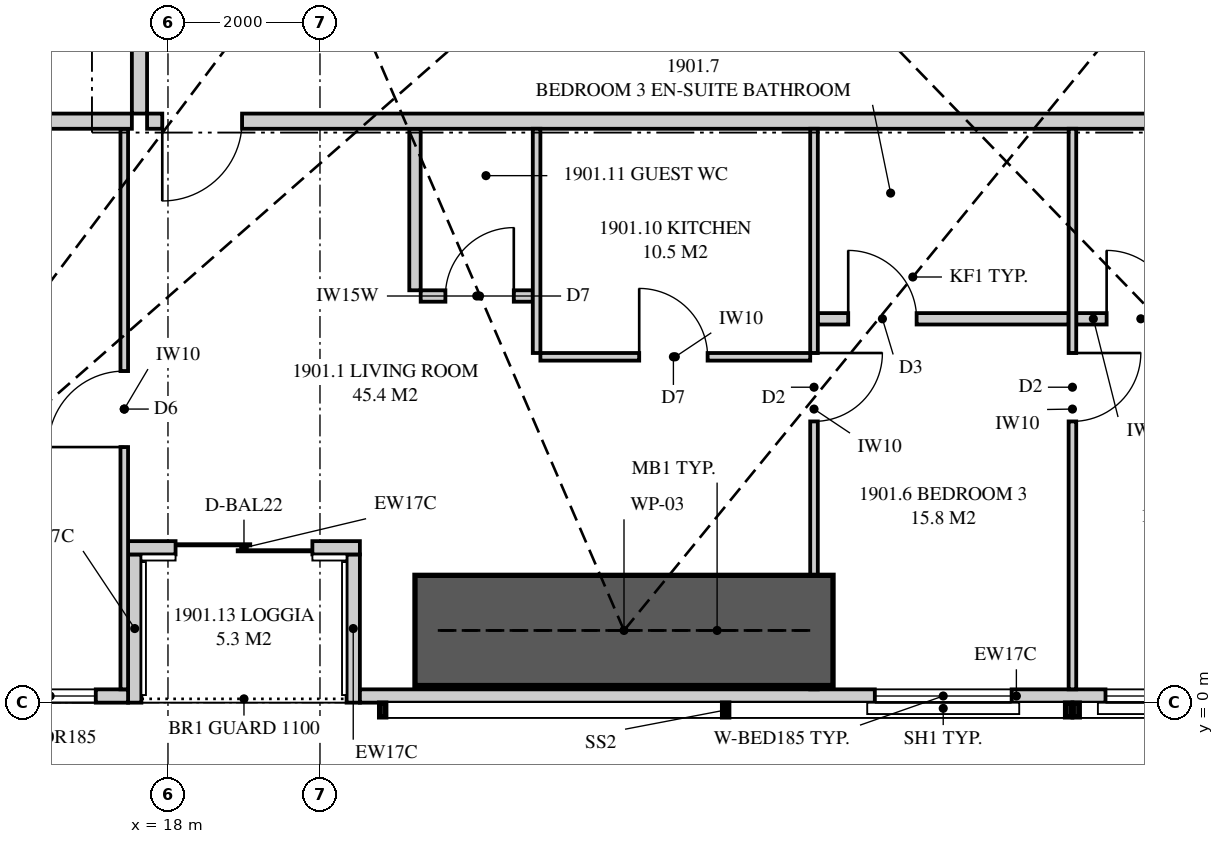
"""IFC4 building model, lengths in metres.
Left out: names, types, materials, properties, quantities, classifications, styles, units other than length and angle.
Written with IfcOpenShell. Run it as: python <this file> out.ifc"""

import sys

from ifc_helpers import new_model, si_unit, direction, frame, frame_2d, origin, place, context, subcontext, project, spatial, polyline, rectangle, outline, extrude, element, fill, save


model = new_model("IFC4")
c1 = context("Model", 3, precision=1e-05, world=origin(), true_north=direction((0.0, 1.0)))
c2 = subcontext(c1, "Body", "Model", "MODEL_VIEW")
j1 = project(units=[si_unit("LENGTHUNIT", "METRE"), si_unit("PLANEANGLEUNIT", "RADIAN")], contexts=[c1])
p1 = place(None, origin())
s1 = spatial("IfcSite", under=j1, at=p1, CompositionType="ELEMENT")
p2 = place(p1, origin())
s2 = spatial("IfcBuilding", under=s1, at=p2, CompositionType="ELEMENT")
p3 = place(p2, frame((0.0, 0.0, 71.25)))
s3 = spatial("IfcBuildingStorey", under=s2, at=p3, CompositionType="ELEMENT", Elevation=71.25)
p4 = place(p3, frame((5.051, 0.087, 0.0), z_axis=(0.0, 0.0, 1.0), x_axis=(1.0, 0.0, 0.0)))
e1 = element("IfcWall", 1, at=p4, inside=s3, PredefinedType="SOLIDWALL", context=c2, shape_type="SweptSolid", body=[
    extrude(rectangle(XDim=12.424, YDim=0.175, at=frame_2d((6.212, 0.0))), origin(), (0.0, 0.0, 1.0), 3.22),
])
p5 = place(p4, frame((2.424, 0.0, 0.4)))
e2 = element("IfcOpeningElement", 2, at=p5, cuts=e1, PredefinedType="OPENING", context=c2, shape_type="SweptSolid", body=[
    extrude(rectangle(XDim=1.8, YDim=1.85, at=frame_2d((0.9, 0.925))), frame((0.0, 0.097, 0.0), z_axis=(0.0, -1.0, 0.0), x_axis=(1.0, 0.0, 0.0)), (0.0, 0.0, 1.0), 0.195),
])
p6 = place(p4, frame((10.799, 0.0, 0.4)))
e3 = element("IfcOpeningElement", 3, at=p6, cuts=e1, PredefinedType="OPENING", context=c2, shape_type="SweptSolid", body=[
    extrude(rectangle(XDim=1.2, YDim=1.85, at=frame_2d((0.6, 0.925))), frame((0.0, 0.097, 0.0), z_axis=(0.0, -1.0, 0.0), x_axis=(1.0, 0.0, 0.0)), (0.0, 0.0, 1.0), 0.195),
])
p7 = place(p3, frame((20.525, 0.087, 0.0), z_axis=(0.0, 0.0, 1.0), x_axis=(1.0, 0.0, 0.0)))
e4 = element("IfcWall", 4, at=p7, inside=s3, PredefinedType="SOLIDWALL", context=c2, shape_type="SweptSolid", body=[
    extrude(rectangle(XDim=17.275, YDim=0.175, at=frame_2d((8.638, 0.0))), origin(), (0.0, 0.0, 1.0), 3.22),
])
p8 = place(p7, frame((6.775, 0.0, 0.4)))
e5 = element("IfcOpeningElement", 5, at=p8, cuts=e4, PredefinedType="OPENING", context=c2, shape_type="SweptSolid", body=[
    extrude(rectangle(XDim=1.8, YDim=1.85, at=frame_2d((0.9, 0.925))), frame((0.0, 0.097, 0.0), z_axis=(0.0, -1.0, 0.0), x_axis=(1.0, 0.0, 0.0)), (0.0, 0.0, 1.0), 0.195),
])
p9 = place(p7, frame((9.81, 0.0, 0.4)))
e6 = element("IfcOpeningElement", 6, at=p9, cuts=e4, PredefinedType="OPENING", context=c2, shape_type="SweptSolid", body=[
    extrude(rectangle(XDim=1.8, YDim=1.85, at=frame_2d((0.9, 0.925))), frame((0.0, 0.097, 0.0), z_axis=(0.0, -1.0, 0.0), x_axis=(1.0, 0.0, 0.0)), (0.0, 0.0, 1.0), 0.195),
])
p10 = place(p3, frame((17.475, 2.038, 0.0), z_axis=(0.0, 0.0, 1.0), x_axis=(1.0, 0.0, 0.0)))
e7 = element("IfcWall", 7, at=p10, inside=s3, PredefinedType="SOLIDWALL", context=c2, shape_type="SweptSolid", body=[
    extrude(rectangle(XDim=3.05, YDim=0.175, at=frame_2d((1.525, 0.0))), origin(), (0.0, 0.0, 1.0), 3.22),
])
p11 = place(p10, frame((0.625, 0.0, 0.0)))
e8 = element("IfcOpeningElement", 8, at=p11, cuts=e7, PredefinedType="OPENING", context=c2, shape_type="SweptSolid", body=[
    extrude(rectangle(XDim=1.8, YDim=2.25, at=frame_2d((0.9, 1.125))), frame((0.0, 0.097, 0.0), z_axis=(0.0, -1.0, 0.0), x_axis=(1.0, 0.0, 0.0)), (0.0, 0.0, 1.0), 0.195),
])
for number, where, z_axis, x_axis in (
    (9, (17.562, 0.0, 0.0), (0.0, 0.0, 1.0), (0.0, 1.0, 0.0)),
    (10, (20.438, 0.0, 0.0), (0.0, 0.0, 1.0), (0.0, 1.0, 0.0)),
):
    element("IfcWall", number, at=place(p3, frame(where, z_axis=z_axis, x_axis=x_axis)), inside=s3, PredefinedType="SOLIDWALL", context=c2, shape_type="SweptSolid", body=[
        extrude(outline(polyline([(0.0, 0.0), (1.95, 0.0), (1.95, 3.22), (1.65, 3.22), (1.65, 2.1), (0.25, 2.1), (0.25, 3.22), (0.0, 3.22), (0.0, 0.0)])), frame((0.0, 0.087, 0.0), z_axis=(0.0, -1.0, 0.0), x_axis=(1.0, 0.0, 0.0)), (0.0, 0.0, 1.0), 0.175),
    ])
p12 = place(p3, frame((17.725, 7.65, 0.0), z_axis=(0.0, 0.0, 1.0), x_axis=(1.0, 0.0, 0.0)))
e11 = element("IfcWall", 11, at=p12, inside=s3, PredefinedType="PARTITIONING", context=c2, shape_type="SweptSolid", body=[
    extrude(outline(polyline([(0.0, 0.0), (16.075, 0.0), (16.075, 3.22), (12.137, 3.22), (12.137, 2.641), (11.364, 2.641), (11.364, 3.22), (11.217, 3.22), (11.217, 2.641), (10.366, 2.641), (10.366, 3.22), (6.564, 3.22), (6.564, 2.694), (5.986, 2.694), (5.986, 3.22), (3.693, 3.22), (3.693, 2.641), (2.439, 2.641), (2.439, 3.22), (0.689, 3.22), (0.689, 2.641), (0.0, 2.641), (0.0, 0.0)])), frame((0.0, 0.1, 0.0), z_axis=(0.0, -1.0, 0.0), x_axis=(1.0, 0.0, 0.0)), (0.0, 0.0, 1.0), 0.2),
])
p13 = place(p12, frame((0.2, 0.0, 0.0)))
e12 = element("IfcOpeningElement", 12, at=p13, cuts=e11, PredefinedType="OPENING", context=c2, shape_type="SweptSolid", body=[
    extrude(rectangle(XDim=1.05, YDim=2.2, at=frame_2d((0.525, 1.1))), frame((0.0, 0.11, 0.0), z_axis=(0.0, -1.0, 0.0), x_axis=(1.0, 0.0, 0.0)), (0.0, 0.0, 1.0), 0.22),
])
p14 = place(p3, frame((26.5, 0.175, 0.0), z_axis=(0.0, 0.0, 1.0), x_axis=(0.0, 1.0, 0.0)))
e13 = element("IfcWall", 13, at=p14, inside=s3, PredefinedType="PARTITIONING", context=c2, shape_type="SweptSolid", body=[
    extrude(outline(polyline([(0.0, 0.0), (7.375, 0.0), (7.375, 3.22), (4.269, 3.22), (4.269, 2.641), (3.4, 2.641), (3.4, 3.22), (1.485, 3.22), (1.485, 2.947), (1.475, 2.947), (1.475, 2.1), (0.075, 2.1), (0.075, 2.947), (0.0, 2.947), (0.0, 0.0)])), frame((0.0, 0.05, 0.0), z_axis=(0.0, -1.0, 0.0), x_axis=(1.0, 0.0, 0.0)), (0.0, 0.0, 1.0), 0.1),
])
p15 = place(p14, frame((3.525, 0.0, 0.0)))
e14 = element("IfcOpeningElement", 14, at=p15, cuts=e13, PredefinedType="OPENING", context=c2, shape_type="SweptSolid", body=[
    extrude(rectangle(XDim=0.9, YDim=2.1, at=frame_2d((0.45, 1.05))), frame((0.0, 0.06, 0.0), z_axis=(0.0, -1.0, 0.0), x_axis=(1.0, 0.0, 0.0)), (0.0, 0.0, 1.0), 0.12),
])
p16 = place(p3, frame((29.9, 0.175, 0.0), z_axis=(0.0, 0.0, 1.0), x_axis=(0.0, 1.0, 0.0)))
e15 = element("IfcWall", 15, at=p16, inside=s3, PredefinedType="PARTITIONING", context=c2, shape_type="SweptSolid", body=[
    extrude(outline(polyline([(0.0, 0.0), (7.375, 0.0), (7.375, 3.22), (6.436, 3.22), (6.436, 2.641), (5.654, 2.641), (5.654, 3.22), (1.475, 3.22), (1.475, 2.1), (0.075, 2.1), (0.075, 3.22), (0.0, 3.22), (0.0, 0.0)])), frame((0.0, 0.05, 0.0), z_axis=(0.0, -1.0, 0.0), x_axis=(1.0, 0.0, 0.0)), (0.0, 0.0, 1.0), 0.1),
])
p17 = place(p16, frame((3.525, 0.0, 0.0)))
e16 = element("IfcOpeningElement", 16, at=p17, cuts=e15, PredefinedType="OPENING", context=c2, shape_type="SweptSolid", body=[
    extrude(rectangle(XDim=0.9, YDim=2.1, at=frame_2d((0.45, 1.05))), frame((0.0, 0.06, 0.0), z_axis=(0.0, -1.0, 0.0), x_axis=(1.0, 0.0, 0.0)), (0.0, 0.0, 1.0), 0.12),
])
p18 = place(p3, frame((26.55, 5.05, 0.0), z_axis=(0.0, 0.0, 1.0), x_axis=(1.0, 0.0, 0.0)))
e17 = element("IfcWall", 17, at=p18, inside=s3, PredefinedType="PLUMBINGWALL", context=c2, shape_type="SweptSolid", body=[
    extrude(outline(polyline([(0.0, 0.0), (3.3, 0.0), (3.3, 3.22), (1.167, 3.22), (1.167, 2.641), (0.434, 2.641), (0.434, 3.22), (0.0, 3.22), (0.0, 0.0)])), frame((0.0, 0.075, 0.0), z_axis=(0.0, -1.0, 0.0), x_axis=(1.0, 0.0, 0.0)), (0.0, 0.0, 1.0), 0.15),
])
p19 = place(p18, frame((0.4, 0.0, 0.0)))
e18 = element("IfcOpeningElement", 18, at=p19, cuts=e17, PredefinedType="OPENING", context=c2, shape_type="SweptSolid", body=[
    extrude(rectangle(XDim=0.9, YDim=2.1, at=frame_2d((0.45, 1.05))), frame((0.0, 0.085, 0.0), z_axis=(0.0, -1.0, 0.0), x_axis=(1.0, 0.0, 0.0)), (0.0, 0.0, 1.0), 0.17),
])
p20 = place(p3, frame((29.95, 5.05, 0.0), z_axis=(0.0, 0.0, 1.0), x_axis=(1.0, 0.0, 0.0)))
e19 = element("IfcWall", 19, at=p20, inside=s3, PredefinedType="PLUMBINGWALL", context=c2, shape_type="SweptSolid", body=[
    extrude(outline(polyline([(0.0, 0.0), (3.85, 0.0), (3.85, 3.22), (1.483, 3.22), (1.483, 2.641), (0.681, 2.641), (0.681, 3.22), (0.0, 3.22), (0.0, 0.0)])), frame((0.0, 0.075, 0.0), z_axis=(0.0, -1.0, 0.0), x_axis=(1.0, 0.0, 0.0)), (0.0, 0.0, 1.0), 0.15),
])
p21 = place(p20, frame((0.4, 0.0, 0.0)))
e20 = element("IfcOpeningElement", 20, at=p21, cuts=e19, PredefinedType="OPENING", context=c2, shape_type="SweptSolid", body=[
    extrude(rectangle(XDim=0.9, YDim=2.1, at=frame_2d((0.45, 1.05))), frame((0.0, 0.085, 0.0), z_axis=(0.0, -1.0, 0.0), x_axis=(1.0, 0.0, 0.0)), (0.0, 0.0, 1.0), 0.17),
])
p22 = place(p3, frame((22.9, 4.55, 0.0), z_axis=(0.0, 0.0, 1.0), x_axis=(1.0, 0.0, 0.0)))
e21 = element("IfcWall", 21, at=p22, inside=s3, PredefinedType="PARTITIONING", context=c2, shape_type="SweptSolid", body=[
    extrude(outline(polyline([(0.0, 0.0), (3.55, 0.0), (3.55, 3.22), (1.389, 3.22), (1.389, 2.694), (0.811, 2.694), (0.811, 3.22), (0.0, 3.22), (0.0, 0.0)])), frame((0.0, 0.05, 0.0), z_axis=(0.0, -1.0, 0.0), x_axis=(1.0, 0.0, 0.0)), (0.0, 0.0, 1.0), 0.1),
])
p23 = place(p22, frame((1.3, 0.0, 0.0)))
e22 = element("IfcOpeningElement", 22, at=p23, cuts=e21, PredefinedType="OPENING", context=c2, shape_type="SweptSolid", body=[
    extrude(rectangle(XDim=0.9, YDim=2.1, at=frame_2d((0.45, 1.05))), frame((0.0, 0.06, 0.0), z_axis=(0.0, -1.0, 0.0), x_axis=(1.0, 0.0, 0.0)), (0.0, 0.0, 1.0), 0.12),
])
p24 = place(p3, frame((22.85, 4.6, 0.0), z_axis=(0.0, 0.0, 1.0), x_axis=(0.0, 1.0, 0.0)))
e23 = element("IfcWall", 23, at=p24, inside=s3, PredefinedType="PARTITIONING", context=c2, shape_type="SweptSolid", body=[
    extrude(rectangle(XDim=2.95, YDim=0.1, at=frame_2d((1.475, 0.0))), origin(), (0.0, 0.0, 1.0), 3.22),
])
p25 = place(p3, frame((21.325, 5.35, 0.0), z_axis=(0.0, 0.0, 1.0), x_axis=(1.0, 0.0, 0.0)))
e24 = element("IfcWall", 24, at=p25, inside=s3, PredefinedType="PLUMBINGWALL", context=c2, shape_type="SweptSolid", body=[
    extrude(outline(polyline([(0.0, 0.0), (1.475, 0.0), (1.475, 3.22), (1.072, 3.22), (1.072, 2.641), (0.493, 2.641), (0.493, 3.22), (0.0, 3.22), (0.0, 0.0)])), frame((0.0, 0.075, 0.0), z_axis=(0.0, -1.0, 0.0), x_axis=(1.0, 0.0, 0.0)), (0.0, 0.0, 1.0), 0.15),
])
p26 = place(p25, frame((0.325, 0.0, 0.0)))
e25 = element("IfcOpeningElement", 25, at=p26, cuts=e24, PredefinedType="OPENING", context=c2, shape_type="SweptSolid", body=[
    extrude(rectangle(XDim=0.9, YDim=2.1, at=frame_2d((0.45, 1.05))), frame((0.0, 0.085, 0.0), z_axis=(0.0, -1.0, 0.0), x_axis=(1.0, 0.0, 0.0)), (0.0, 0.0, 1.0), 0.17),
])
p27 = place(p3, frame((21.25, 5.425, 0.0), z_axis=(0.0, 0.0, 1.0), x_axis=(0.0, 1.0, 0.0)))
e26 = element("IfcWall", 26, at=p27, inside=s3, PredefinedType="PLUMBINGWALL", context=c2, shape_type="SweptSolid", body=[
    extrude(outline(polyline([(0.0, 0.0), (2.125, 0.0), (2.125, 2.641), (1.146, 2.641), (1.146, 3.22), (0.0, 3.22), (0.0, 0.0)])), frame((0.0, 0.075, 0.0), z_axis=(0.0, -1.0, 0.0), x_axis=(1.0, 0.0, 0.0)), (0.0, 0.0, 1.0), 0.15),
])
p28 = place(p3, frame((17.425, 0.175, 0.0), z_axis=(0.0, 0.0, 1.0), x_axis=(0.0, 1.0, 0.0)))
e27 = element("IfcWall", 27, at=p28, inside=s3, PredefinedType="PARTITIONING", context=c2, shape_type="SweptSolid", body=[
    extrude(outline(polyline([(0.0, 0.0), (7.375, 0.0), (7.375, 3.22), (7.113, 3.22), (7.113, 2.641), (6.195, 2.641), (6.195, 3.22), (5.015, 3.22), (5.015, 2.641), (4.299, 2.641), (4.299, 3.22), (1.475, 3.22), (1.475, 2.1), (0.075, 2.1), (0.075, 3.22), (0.0, 3.22), (0.0, 0.0)])), frame((0.0, 0.05, 0.0), z_axis=(0.0, -1.0, 0.0), x_axis=(1.0, 0.0, 0.0)), (0.0, 0.0, 1.0), 0.1),
])
p29 = place(p28, frame((3.188, 0.0, 0.0)))
e28 = element("IfcOpeningElement", 28, at=p29, cuts=e27, PredefinedType="OPENING", context=c2, shape_type="SweptSolid", body=[
    extrude(rectangle(XDim=1.0, YDim=2.1, at=frame_2d((0.5, 1.05))), frame((0.0, 0.06, 0.0), z_axis=(0.0, -1.0, 0.0), x_axis=(1.0, 0.0, 0.0)), (0.0, 0.0, 1.0), 0.12),
])
p30 = place(p3, frame((2.0, 7.65, 0.0), z_axis=(0.0, 0.0, 1.0), x_axis=(1.0, 0.0, 0.0)))
e29 = element("IfcWall", 29, at=p30, inside=s3, PredefinedType="PARTITIONING", context=c2, shape_type="SweptSolid", body=[
    extrude(outline(polyline([(0.0, 0.0), (15.525, 0.0), (15.525, 3.22), (11.349, 3.22), (11.349, 2.621), (10.651, 2.621), (10.651, 3.22), (9.51, 3.22), (9.51, 2.62), (6.89, 2.62), (6.89, 3.22), (2.98, 3.22), (2.98, 2.621), (2.543, 2.621), (2.543, 2.1), (1.092, 2.1), (1.092, 3.22), (0.0, 3.22), (0.0, 0.0)])), frame((0.0, 0.1, 0.0), z_axis=(0.0, -1.0, 0.0), x_axis=(1.0, 0.0, 0.0)), (0.0, 0.0, 1.0), 0.2),
])
p31 = place(p3, frame((17.625, 7.75, 0.0), z_axis=(0.0, 0.0, 1.0), x_axis=(0.0, 1.0, 0.0)))
e30 = element("IfcWall", 30, at=p31, inside=s3, PredefinedType="PARTITIONING", context=c2, shape_type="SweptSolid", body=[
    extrude(outline(polyline([(0.0, 0.0), (6.15, 0.0), (6.15, 3.22), (5.75, 3.22), (5.75, 2.22), (4.75, 2.22), (4.75, 3.22), (0.0, 3.22), (0.0, 0.0)])), frame((0.0, 0.1, 0.0), z_axis=(0.0, -1.0, 0.0), x_axis=(1.0, 0.0, 0.0)), (0.0, 0.0, 1.0), 0.2),
])
p32 = place(p31, frame((2.175, 0.0, 0.0)))
e31 = element("IfcOpeningElement", 31, at=p32, cuts=e30, PredefinedType="OPENING", context=c2, shape_type="SweptSolid", body=[
    extrude(rectangle(XDim=1.8, YDim=2.1, at=frame_2d((0.9, 1.05))), frame((0.0, 0.11, 0.0), z_axis=(0.0, -1.0, 0.0), x_axis=(1.0, 0.0, 0.0)), (0.0, 0.0, 1.0), 0.22),
])
p33 = place(p3, frame((21.25, 0.95, 0.0), z_axis=(0.0, 0.0, 1.0), x_axis=(1.0, 0.0, 0.0)))
e32 = element("IfcWall", 32, at=p33, inside=s3, PredefinedType="SHEAR", context=c2, shape_type="SweptSolid", body=[
    extrude(rectangle(XDim=5.5, YDim=1.45, at=frame_2d((2.75, 0.0))), origin(), (0.0, 0.0, 1.0), 3.5),
])
p34 = place(p6, origin())
e33 = element("IfcWindow", 33, at=p34, inside=s3, PartitioningType="SINGLE_PANEL", PredefinedType="WINDOW", context=c2, shape_type="SweptSolid", body=[
    extrude(rectangle(XDim=1.2, YDim=1.85, at=frame_2d((0.6, 0.925))), frame((0.0, 0.03, 0.0), z_axis=(0.0, -1.0, 0.0), x_axis=(1.0, 0.0, 0.0)), (0.0, 0.0, 1.0), 0.06),
])
fill(e3, e33)
p35 = place(p11, origin())
e34 = element("IfcDoor", 34, at=p35, inside=s3, OperationType="SLIDING_TO_LEFT", PredefinedType="DOOR", context=c2, shape_type="SweptSolid", body=[
    extrude(rectangle(XDim=1.8, YDim=2.25, at=frame_2d((0.9, 1.125))), frame((0.0, 0.025, 0.0), z_axis=(0.0, -1.0, 0.0), x_axis=(1.0, 0.0, 0.0)), (0.0, 0.0, 1.0), 0.05),
])
fill(e8, e34)
p36 = place(p8, origin())
e35 = element("IfcWindow", 35, at=p36, inside=s3, PartitioningType="SINGLE_PANEL", PredefinedType="WINDOW", context=c2, shape_type="SweptSolid", body=[
    extrude(rectangle(XDim=1.8, YDim=1.85, at=frame_2d((0.9, 0.925))), frame((0.0, 0.03, 0.0), z_axis=(0.0, -1.0, 0.0), x_axis=(1.0, 0.0, 0.0)), (0.0, 0.0, 1.0), 0.06),
])
fill(e5, e35)
p37 = place(p9, origin())
e36 = element("IfcWindow", 36, at=p37, inside=s3, PartitioningType="SINGLE_PANEL", PredefinedType="WINDOW", context=c2, shape_type="SweptSolid", body=[
    extrude(rectangle(XDim=1.8, YDim=1.85, at=frame_2d((0.9, 0.925))), frame((0.0, 0.03, 0.0), z_axis=(0.0, -1.0, 0.0), x_axis=(1.0, 0.0, 0.0)), (0.0, 0.0, 1.0), 0.06),
])
fill(e6, e36)
p38 = place(p13, frame((1.05, 0.0, 0.0), z_axis=(0.0, 0.0, 1.0), x_axis=(-1.0, 0.0, 0.0)))
e37 = element("IfcDoor", 37, at=p38, inside=s3, OperationType="SINGLE_SWING_RIGHT", PredefinedType="DOOR", context=c2, shape_type="SweptSolid", body=[
    extrude(rectangle(XDim=1.05, YDim=2.2, at=frame_2d((0.525, 1.1))), frame((0.0, 0.025, 0.0), z_axis=(0.0, -1.0, 0.0), x_axis=(1.0, 0.0, 0.0)), (0.0, 0.0, 1.0), 0.05),
])
fill(e12, e37)
p39 = place(p15, frame((0.9, 0.0, 0.0), z_axis=(0.0, 0.0, 1.0), x_axis=(-1.0, 0.0, 0.0)))
e38 = element("IfcDoor", 38, at=p39, inside=s3, OperationType="SINGLE_SWING_LEFT", PredefinedType="DOOR", context=c2, shape_type="SweptSolid", body=[
    extrude(rectangle(XDim=0.9, YDim=2.1, at=frame_2d((0.45, 1.05))), frame((0.0, 0.025, 0.0), z_axis=(0.0, -1.0, 0.0), x_axis=(1.0, 0.0, 0.0)), (0.0, 0.0, 1.0), 0.05),
])
fill(e14, e38)
p40 = place(p19, origin())
e39 = element("IfcDoor", 39, at=p40, inside=s3, OperationType="SINGLE_SWING_LEFT", PredefinedType="DOOR", context=c2, shape_type="SweptSolid", body=[
    extrude(rectangle(XDim=0.9, YDim=2.1, at=frame_2d((0.45, 1.05))), frame((0.0, 0.025, 0.0), z_axis=(0.0, -1.0, 0.0), x_axis=(1.0, 0.0, 0.0)), (0.0, 0.0, 1.0), 0.05),
])
fill(e18, e39)
p41 = place(p17, frame((0.9, 0.0, 0.0), z_axis=(0.0, 0.0, 1.0), x_axis=(-1.0, 0.0, 0.0)))
e40 = element("IfcDoor", 40, at=p41, inside=s3, OperationType="SINGLE_SWING_LEFT", PredefinedType="DOOR", context=c2, shape_type="SweptSolid", body=[
    extrude(rectangle(XDim=0.9, YDim=2.1, at=frame_2d((0.45, 1.05))), frame((0.0, 0.025, 0.0), z_axis=(0.0, -1.0, 0.0), x_axis=(1.0, 0.0, 0.0)), (0.0, 0.0, 1.0), 0.05),
])
fill(e16, e40)
p42 = place(p21, origin())
e41 = element("IfcDoor", 41, at=p42, inside=s3, OperationType="SINGLE_SWING_LEFT", PredefinedType="DOOR", context=c2, shape_type="SweptSolid", body=[
    extrude(rectangle(XDim=0.9, YDim=2.1, at=frame_2d((0.45, 1.05))), frame((0.0, 0.025, 0.0), z_axis=(0.0, -1.0, 0.0), x_axis=(1.0, 0.0, 0.0)), (0.0, 0.0, 1.0), 0.05),
])
fill(e20, e41)
p43 = place(p23, origin())
e42 = element("IfcDoor", 42, at=p43, inside=s3, OperationType="SINGLE_SWING_LEFT", PredefinedType="DOOR", context=c2, shape_type="SweptSolid", body=[
    extrude(rectangle(XDim=0.9, YDim=2.1, at=frame_2d((0.45, 1.05))), frame((0.0, 0.025, 0.0), z_axis=(0.0, -1.0, 0.0), x_axis=(1.0, 0.0, 0.0)), (0.0, 0.0, 1.0), 0.05),
])
fill(e22, e42)
p44 = place(p26, origin())
e43 = element("IfcDoor", 43, at=p44, inside=s3, OperationType="SINGLE_SWING_RIGHT", PredefinedType="DOOR", context=c2, shape_type="SweptSolid", body=[
    extrude(rectangle(XDim=0.9, YDim=2.1, at=frame_2d((0.45, 1.05))), frame((0.0, 0.025, 0.0), z_axis=(0.0, -1.0, 0.0), x_axis=(1.0, 0.0, 0.0)), (0.0, 0.0, 1.0), 0.05),
])
fill(e25, e43)
p45 = place(p29, origin())
e44 = element("IfcDoor", 44, at=p45, inside=s3, OperationType="SINGLE_SWING_LEFT", PredefinedType="DOOR", context=c2, shape_type="SweptSolid", body=[
    extrude(rectangle(XDim=1.0, YDim=2.1, at=frame_2d((0.5, 1.05))), frame((0.0, 0.025, 0.0), z_axis=(0.0, -1.0, 0.0), x_axis=(1.0, 0.0, 0.0)), (0.0, 0.0, 1.0), 0.05),
])
fill(e28, e44)
save(model, sys.argv[1])
